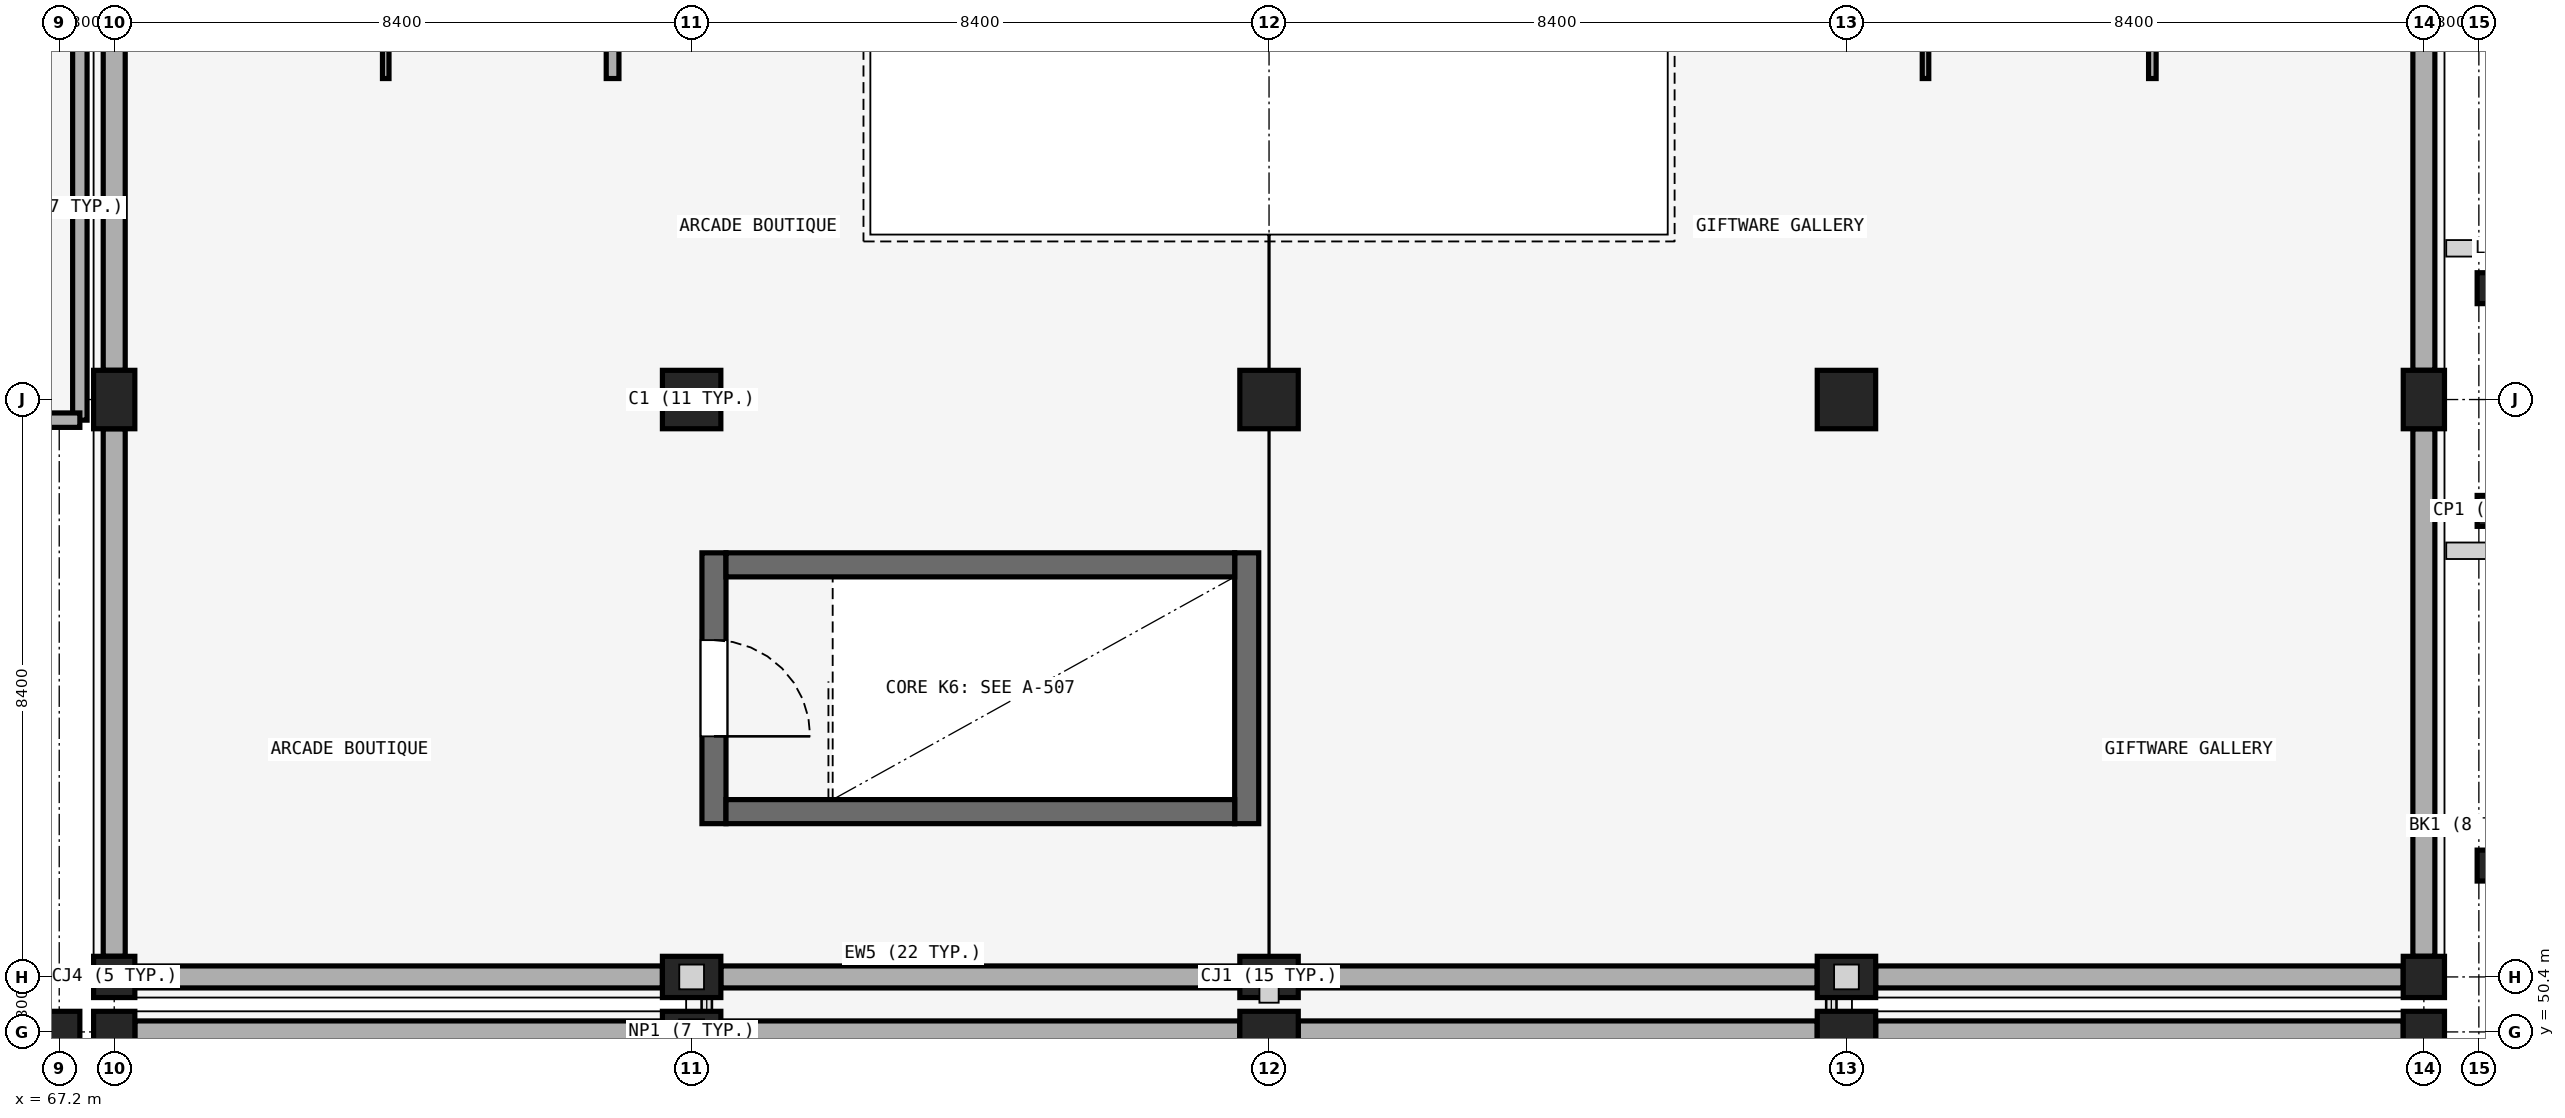
"""IFC4 building model, lengths in metres.
Left out: names, types, materials, properties, quantities, classifications, styles, units other than length and angle.
Written with IfcOpenShell. Run it as: python <this file> out.ifc"""

import sys

from ifc_helpers import new_model, si_unit, direction, frame, frame_2d, origin, origin_2d, place, context, subcontext, project, spatial, rectangle, extrude, element, fill, save


model = new_model("IFC4")
c1 = context("Model", 3, precision=1e-05, world=origin(), true_north=direction((0.0, 1.0)))
c2 = subcontext(c1, "Body", "Model", "MODEL_VIEW")
j1 = project(units=[si_unit("LENGTHUNIT", "METRE"), si_unit("PLANEANGLEUNIT", "RADIAN")], contexts=[c1])
p1 = place(None, origin())
s1 = spatial("IfcSite", under=j1, at=p1, CompositionType="ELEMENT")
p2 = place(p1, origin())
s2 = spatial("IfcBuilding", under=s1, at=p2, CompositionType="ELEMENT")
p3 = place(p2, frame((0.0, 0.0, 9.9)))
s3 = spatial("IfcBuildingStorey", under=s2, at=p3, CompositionType="ELEMENT", Elevation=9.9)
p4 = place(p3, frame((68.0, 50.4, 0.0), z_axis=(0.0, 0.0, 1.0), x_axis=(1.0, 0.0, 0.0)))
e1 = element("IfcColumn", 1, at=p4, inside=s3, PredefinedType="COLUMN", context=c2, shape_type="SweptSolid", body=[
    extrude(rectangle(XDim=0.6, YDim=0.6, at=origin_2d()), origin(), (0.0, 0.0, 1.0), 4.5),
])
for number, where, z_axis, x_axis in (
    (2, (76.4, 50.4, 0.0), (0.0, 0.0, 1.0), (0.0, 1.0, 0.0)),
    (3, (84.8, 50.4, 0.0), (0.0, 0.0, 1.0), (0.0, 1.0, 0.0)),
    (4, (93.2, 50.4, 0.0), (0.0, 0.0, 1.0), (0.0, 1.0, 0.0)),
):
    element("IfcColumn", number, at=place(p3, frame(where, z_axis=z_axis, x_axis=x_axis)), inside=s3, PredefinedType="COLUMN", context=c2, shape_type="SweptSolid", body=[
        extrude(rectangle(XDim=0.6, YDim=0.85, at=origin_2d()), origin(), (0.0, 0.0, 1.0), 4.5),
    ])
for number, where, z_axis, x_axis in (
    (5, (101.6, 50.4, 0.0), (0.0, 0.0, 1.0), (1.0, 0.0, 0.0)),
    (6, (68.0, 51.2, 0.0), (0.0, 0.0, 1.0), (1.0, 0.0, 0.0)),
):
    element("IfcColumn", number, at=place(p3, frame(where, z_axis=z_axis, x_axis=x_axis)), inside=s3, PredefinedType="COLUMN", context=c2, shape_type="SweptSolid", body=[
        extrude(rectangle(XDim=0.6, YDim=0.6, at=origin_2d()), origin(), (0.0, 0.0, 1.0), 4.5),
    ])
for number, where, z_axis, x_axis in (
    (7, (76.4, 51.2, 0.0), (0.0, 0.0, 1.0), (0.0, 1.0, 0.0)),
    (8, (84.8, 51.2, 0.0), (0.0, 0.0, 1.0), (0.0, 1.0, 0.0)),
    (9, (93.2, 51.2, 0.0), (0.0, 0.0, 1.0), (0.0, 1.0, 0.0)),
):
    element("IfcColumn", number, at=place(p3, frame(where, z_axis=z_axis, x_axis=x_axis)), inside=s3, PredefinedType="COLUMN", context=c2, shape_type="SweptSolid", body=[
        extrude(rectangle(XDim=0.6, YDim=0.85, at=origin_2d()), origin(), (0.0, 0.0, 1.0), 4.5),
    ])
p5 = place(p3, frame((101.6, 51.2, 0.0), z_axis=(0.0, 0.0, 1.0), x_axis=(1.0, 0.0, 0.0)))
e10 = element("IfcColumn", 10, at=p5, inside=s3, PredefinedType="COLUMN", context=c2, shape_type="SweptSolid", body=[
    extrude(rectangle(XDim=0.6, YDim=0.6, at=origin_2d()), origin(), (0.0, 0.0, 1.0), 4.5),
])
p6 = place(p3, frame((68.0, 59.6, 0.0), z_axis=(0.0, 0.0, 1.0), x_axis=(1.0, 0.0, 0.0)))
e11 = element("IfcColumn", 11, at=p6, inside=s3, PredefinedType="COLUMN", context=c2, shape_type="SweptSolid", body=[
    extrude(rectangle(XDim=0.6, YDim=0.85, at=origin_2d()), origin(), (0.0, 0.0, 1.0), 4.5),
])
for number, where, z_axis, x_axis in (
    (12, (76.4, 59.6, 0.0), (0.0, 0.0, 1.0), (1.0, 0.0, 0.0)),
    (13, (84.8, 59.6, 0.0), (0.0, 0.0, 1.0), (1.0, 0.0, 0.0)),
    (14, (93.2, 59.6, 0.0), (0.0, 0.0, 1.0), (1.0, 0.0, 0.0)),
):
    element("IfcColumn", number, at=place(p3, frame(where, z_axis=z_axis, x_axis=x_axis)), inside=s3, PredefinedType="COLUMN", context=c2, shape_type="SweptSolid", body=[
        extrude(rectangle(XDim=0.85, YDim=0.85, at=origin_2d()), origin(), (0.0, 0.0, 1.0), 4.5),
    ])
p7 = place(p3, frame((101.6, 59.6, 0.0), z_axis=(0.0, 0.0, 1.0), x_axis=(1.0, 0.0, 0.0)))
e15 = element("IfcColumn", 15, at=p7, inside=s3, PredefinedType="COLUMN", context=c2, shape_type="SweptSolid", body=[
    extrude(rectangle(XDim=0.6, YDim=0.85, at=origin_2d()), origin(), (0.0, 0.0, 1.0), 4.5),
])
p8 = place(p3, frame((67.2, 50.4, 0.0), z_axis=(0.0, 0.0, 1.0), x_axis=(1.0, 0.0, 0.0)))
e16 = element("IfcColumn", 16, at=p8, inside=s3, PredefinedType="COLUMN", context=c2, shape_type="SweptSolid", body=[
    extrude(rectangle(XDim=0.6, YDim=0.6, at=origin_2d()), origin(), (0.0, 0.0, 1.0), 4.5),
])
for number, where, z_axis, x_axis in (
    (17, (102.65, 52.82, 0.0), (0.0, 0.0, 1.0), (0.0, 1.0, 0.0)),
    (18, (102.65, 57.98, 0.0), (0.0, 0.0, 1.0), (0.0, 1.0, 0.0)),
    (19, (102.65, 61.22, 0.0), (0.0, 0.0, 1.0), (0.0, 1.0, 0.0)),
):
    element("IfcColumn", number, at=place(p3, frame(where, z_axis=z_axis, x_axis=x_axis)), inside=s3, PredefinedType="PILASTER", context=c2, shape_type="SweptSolid", body=[
        extrude(rectangle(XDim=0.45, YDim=0.55, at=origin_2d()), origin(), (0.0, 0.0, 1.0), 4.5),
    ])
p9 = place(p3, frame((68.3, 50.4, 0.0), z_axis=(0.0, 0.0, 1.0), x_axis=(1.0, 0.0, 0.0)))
e20 = element("IfcWall", 20, at=p9, inside=s3, PredefinedType="SOLIDWALL", context=c2, shape_type="SweptSolid", body=[
    extrude(rectangle(XDim=7.675, YDim=0.32, at=frame_2d((3.837, 0.0))), origin(), (0.0, 0.0, 1.0), 3.49),
])
p10 = place(p3, frame((76.825, 50.4, 0.0), z_axis=(0.0, 0.0, 1.0), x_axis=(1.0, 0.0, 0.0)))
e21 = element("IfcWall", 21, at=p10, inside=s3, PredefinedType="SOLIDWALL", context=c2, shape_type="SweptSolid", body=[
    extrude(rectangle(XDim=7.55, YDim=0.32, at=frame_2d((3.775, 0.0))), origin(), (0.0, 0.0, 1.0), 3.49),
])
p11 = place(p3, frame((85.225, 50.4, 0.0), z_axis=(0.0, 0.0, 1.0), x_axis=(1.0, 0.0, 0.0)))
e22 = element("IfcWall", 22, at=p11, inside=s3, PredefinedType="SOLIDWALL", context=c2, shape_type="SweptSolid", body=[
    extrude(rectangle(XDim=7.55, YDim=0.32, at=frame_2d((3.775, 0.0))), origin(), (0.0, 0.0, 1.0), 3.49),
])
for number, where, z_axis, x_axis in (
    (23, (93.625, 50.4, 0.0), (0.0, 0.0, 1.0), (1.0, 0.0, 0.0)),
    (24, (68.3, 51.2, 0.0), (0.0, 0.0, 1.0), (1.0, 0.0, 0.0)),
):
    element("IfcWall", number, at=place(p3, frame(where, z_axis=z_axis, x_axis=x_axis)), inside=s3, PredefinedType="SOLIDWALL", context=c2, shape_type="SweptSolid", body=[
        extrude(rectangle(XDim=7.675, YDim=0.32, at=frame_2d((3.837, 0.0))), origin(), (0.0, 0.0, 1.0), 3.49),
    ])
p12 = place(p3, frame((76.825, 51.2, 0.0), z_axis=(0.0, 0.0, 1.0), x_axis=(1.0, 0.0, 0.0)))
e25 = element("IfcWall", 25, at=p12, inside=s3, PredefinedType="SOLIDWALL", context=c2, shape_type="SweptSolid", body=[
    extrude(rectangle(XDim=7.55, YDim=0.32, at=frame_2d((3.775, 0.0))), origin(), (0.0, 0.0, 1.0), 3.49),
])
p13 = place(p3, frame((85.225, 51.2, 0.0), z_axis=(0.0, 0.0, 1.0), x_axis=(1.0, 0.0, 0.0)))
e26 = element("IfcWall", 26, at=p13, inside=s3, PredefinedType="SOLIDWALL", context=c2, shape_type="SweptSolid", body=[
    extrude(rectangle(XDim=7.55, YDim=0.32, at=frame_2d((3.775, 0.0))), origin(), (0.0, 0.0, 1.0), 3.49),
])
for number, where, z_axis, x_axis in (
    (27, (93.625, 51.2, 0.0), (0.0, 0.0, 1.0), (1.0, 0.0, 0.0)),
    (28, (68.0, 51.5, 0.0), (0.0, 0.0, 1.0), (0.0, 1.0, 0.0)),
):
    element("IfcWall", number, at=place(p3, frame(where, z_axis=z_axis, x_axis=x_axis)), inside=s3, PredefinedType="SOLIDWALL", context=c2, shape_type="SweptSolid", body=[
        extrude(rectangle(XDim=7.675, YDim=0.32, at=frame_2d((3.837, 0.0))), origin(), (0.0, 0.0, 1.0), 3.49),
    ])
p14 = place(p3, frame((68.0, 60.025, 0.0), z_axis=(0.0, 0.0, 1.0), x_axis=(0.0, 1.0, 0.0)))
e29 = element("IfcWall", 29, at=p14, inside=s3, PredefinedType="SOLIDWALL", context=c2, shape_type="SweptSolid", body=[
    extrude(rectangle(XDim=7.55, YDim=0.32, at=frame_2d((3.775, 0.0))), origin(), (0.0, 0.0, 1.0), 3.49),
])
p15 = place(p3, frame((101.6, 51.5, 0.0), z_axis=(0.0, 0.0, 1.0), x_axis=(0.0, 1.0, 0.0)))
e30 = element("IfcWall", 30, at=p15, inside=s3, PredefinedType="SOLIDWALL", context=c2, shape_type="SweptSolid", body=[
    extrude(rectangle(XDim=7.675, YDim=0.32, at=frame_2d((3.837, 0.0))), origin(), (0.0, 0.0, 1.0), 3.49),
])
p16 = place(p3, frame((101.6, 60.025, 0.0), z_axis=(0.0, 0.0, 1.0), x_axis=(0.0, 1.0, 0.0)))
e31 = element("IfcWall", 31, at=p16, inside=s3, PredefinedType="SOLIDWALL", context=c2, shape_type="SweptSolid", body=[
    extrude(rectangle(XDim=7.55, YDim=0.32, at=frame_2d((3.775, 0.0))), origin(), (0.0, 0.0, 1.0), 3.49),
])
p17 = place(p3, frame((67.5, 59.3, 0.0), z_axis=(0.0, 0.0, 1.0), x_axis=(0.0, 1.0, 0.0)))
e32 = element("IfcWall", 32, at=p17, inside=s3, PredefinedType="PARAPET", context=c2, shape_type="SweptSolid", body=[
    extrude(rectangle(XDim=8.35, YDim=0.21, at=frame_2d((4.175, 0.0))), origin(), (0.0, 0.0, 1.0), 0.95),
])
p18 = place(p3, frame((50.75, 59.3, 0.0), z_axis=(0.0, 0.0, 1.0), x_axis=(1.0, 0.0, 0.0)))
e33 = element("IfcWall", 33, at=p18, inside=s3, PredefinedType="PARAPET", context=c2, shape_type="SweptSolid", body=[
    extrude(rectangle(XDim=16.75, YDim=0.21, at=frame_2d((8.375, 0.0))), origin(), (0.0, 0.0, 1.0), 0.95),
])
p19 = place(p3, frame((76.725, 57.37, 0.0), z_axis=(0.0, 0.0, 1.0), x_axis=(0.0, -1.0, 0.0)))
e34 = element("IfcWall", 34, at=p19, inside=s3, PredefinedType="SHEAR", context=c2, shape_type="SweptSolid", body=[
    extrude(rectangle(XDim=3.94, YDim=0.35, at=frame_2d((1.97, 0.0))), origin(), (0.0, 0.0, 1.0), 4.24),
])
p20 = place(p19, frame((1.27, 0.0, 0.0)))
e35 = element("IfcOpeningElement", 35, at=p20, cuts=e34, PredefinedType="OPENING", context=c2, shape_type="SweptSolid", body=[
    extrude(rectangle(XDim=1.4, YDim=2.15, at=frame_2d((0.7, 1.075))), frame((0.0, 0.185, 0.0), z_axis=(0.0, -1.0, 0.0), x_axis=(1.0, 0.0, 0.0)), (0.0, 0.0, 1.0), 0.37),
])
p21 = place(p3, frame((84.475, 53.43, 0.0), z_axis=(0.0, 0.0, 1.0), x_axis=(0.0, 1.0, 0.0)))
e36 = element("IfcWall", 36, at=p21, inside=s3, PredefinedType="SHEAR", context=c2, shape_type="SweptSolid", body=[
    extrude(rectangle(XDim=3.94, YDim=0.35, at=frame_2d((1.97, 0.0))), origin(), (0.0, 0.0, 1.0), 4.24),
])
for number, where, z_axis, x_axis in (
    (37, (76.9, 53.605, 0.0), (0.0, 0.0, 1.0), (1.0, 0.0, 0.0)),
    (38, (76.9, 57.195, 0.0), (0.0, 0.0, 1.0), (1.0, 0.0, 0.0)),
):
    element("IfcWall", number, at=place(p3, frame(where, z_axis=z_axis, x_axis=x_axis)), inside=s3, PredefinedType="SHEAR", context=c2, shape_type="SweptSolid", body=[
        extrude(rectangle(XDim=7.4, YDim=0.35, at=frame_2d((3.7, 0.0))), origin(), (0.0, 0.0, 1.0), 4.24),
    ])
p22 = place(p3, frame((71.95, 64.27, 0.0), z_axis=(0.0, 0.0, 1.0), x_axis=(0.0, 1.0, 0.0)))
e39 = element("IfcWall", 39, at=p22, inside=s3, PredefinedType="PARTITIONING", context=c2, shape_type="SweptSolid", body=[
    extrude(rectangle(XDim=7.61, YDim=0.095, at=frame_2d((3.805, 0.0))), origin(), (0.0, 0.0, 1.0), 3.49),
])
p23 = place(p22, frame((3.125, 0.0, 0.0)))
e40 = element("IfcOpeningElement", 40, at=p23, cuts=e39, PredefinedType="OPENING", context=c2, shape_type="SweptSolid", body=[
    extrude(rectangle(XDim=1.36, YDim=2.1, at=frame_2d((0.68, 1.05))), frame((0.0, 0.057, 0.0), z_axis=(0.0, -1.0, 0.0), x_axis=(1.0, 0.0, 0.0)), (0.0, 0.0, 1.0), 0.115),
])
p24 = place(p3, frame((75.25, 64.27, 0.0), z_axis=(0.0, 0.0, 1.0), x_axis=(0.0, 1.0, 0.0)))
e41 = element("IfcWall", 41, at=p24, inside=s3, PredefinedType="PARTITIONING", context=c2, shape_type="SweptSolid", body=[
    extrude(rectangle(XDim=7.61, YDim=0.185, at=frame_2d((3.805, 0.0))), origin(), (0.0, 0.0, 1.0), 3.49),
])
p25 = place(p24, frame((1.025, 0.0, 0.0)))
e42 = element("IfcOpeningElement", 42, at=p25, cuts=e41, PredefinedType="OPENING", context=c2, shape_type="SweptSolid", body=[
    extrude(rectangle(XDim=1.36, YDim=2.22, at=frame_2d((0.68, 1.11))), frame((0.0, 0.103, 0.0), z_axis=(0.0, -1.0, 0.0), x_axis=(1.0, 0.0, 0.0)), (0.0, 0.0, 1.0), 0.205),
])
p26 = place(p3, frame((97.65, 64.27, 0.0), z_axis=(0.0, 0.0, 1.0), x_axis=(0.0, 1.0, 0.0)))
e43 = element("IfcWall", 43, at=p26, inside=s3, PredefinedType="PARTITIONING", context=c2, shape_type="SweptSolid", body=[
    extrude(rectangle(XDim=7.61, YDim=0.11, at=frame_2d((3.805, 0.0))), origin(), (0.0, 0.0, 1.0), 3.49),
])
p27 = place(p26, frame((3.085, 0.0, 0.0)))
e44 = element("IfcOpeningElement", 44, at=p27, cuts=e43, PredefinedType="OPENING", context=c2, shape_type="SweptSolid", body=[
    extrude(rectangle(XDim=1.44, YDim=2.34, at=frame_2d((0.72, 1.17))), frame((0.0, 0.065, 0.0), z_axis=(0.0, -1.0, 0.0), x_axis=(1.0, 0.0, 0.0)), (0.0, 0.0, 1.0), 0.13),
])
p28 = place(p3, frame((94.35, 64.27, 0.0), z_axis=(0.0, 0.0, 1.0), x_axis=(0.0, 1.0, 0.0)))
e45 = element("IfcWall", 45, at=p28, inside=s3, PredefinedType="PARTITIONING", context=c2, shape_type="SweptSolid", body=[
    extrude(rectangle(XDim=7.61, YDim=0.095, at=frame_2d((3.805, 0.0))), origin(), (0.0, 0.0, 1.0), 3.49),
])
p29 = place(p28, frame((5.185, 0.0, 0.0)))
e46 = element("IfcOpeningElement", 46, at=p29, cuts=e45, PredefinedType="OPENING", context=c2, shape_type="SweptSolid", body=[
    extrude(rectangle(XDim=1.44, YDim=2.46, at=frame_2d((0.72, 1.23))), frame((0.0, 0.057, 0.0), z_axis=(0.0, -1.0, 0.0), x_axis=(1.0, 0.0, 0.0)), (0.0, 0.0, 1.0), 0.115),
])
p30 = place(p20, origin())
e47 = element("IfcDoor", 47, at=p30, inside=s3, OperationType="SINGLE_SWING_RIGHT", PredefinedType="DOOR", context=c2, shape_type="SweptSolid", body=[
    extrude(rectangle(XDim=1.4, YDim=2.15, at=frame_2d((0.7, 1.075))), frame((0.0, 0.025, 0.0), z_axis=(0.0, -1.0, 0.0), x_axis=(1.0, 0.0, 0.0)), (0.0, 0.0, 1.0), 0.05),
])
fill(e35, e47)
save(model, sys.argv[1])
